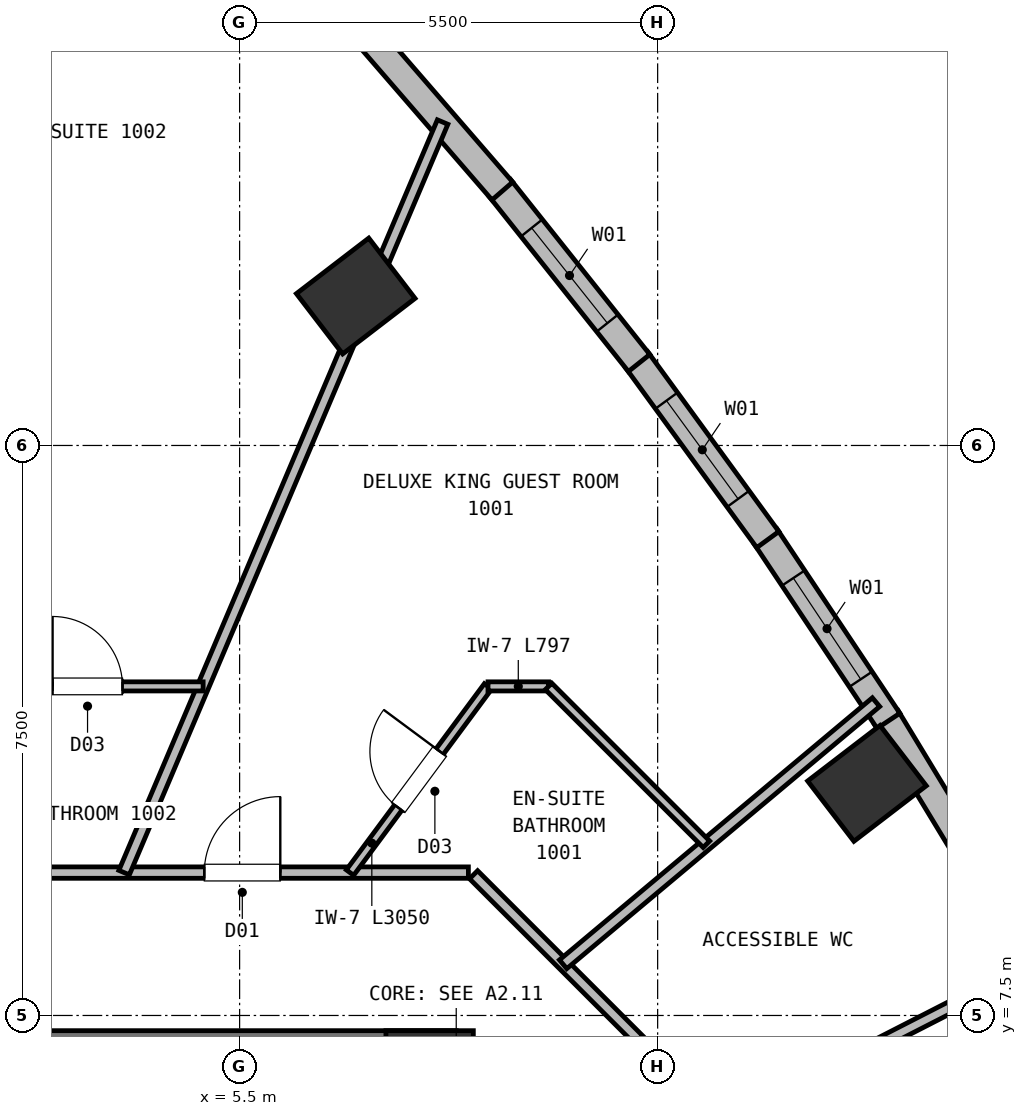
"""IFC4 building model, lengths in metres.
Left out: names, types, materials, properties, quantities, classifications, styles, units other than length and angle.
Written with IfcOpenShell. Run it as: python <this file> out.ifc"""

import sys

from ifc_helpers import new_model, si_unit, direction, frame, frame_2d, origin, origin_2d, place, context, subcontext, project, spatial, rectangle, extrude, element, fill, save


model = new_model("IFC4")
c1 = context("Model", 3, precision=1e-05, world=origin(), true_north=direction((0.0, 1.0)))
c2 = subcontext(c1, "Body", "Model", "MODEL_VIEW")
j1 = project(units=[si_unit("LENGTHUNIT", "METRE"), si_unit("PLANEANGLEUNIT", "RADIAN")], contexts=[c1])
p1 = place(None, origin())
s1 = spatial("IfcSite", under=j1, at=p1, CompositionType="ELEMENT")
p2 = place(p1, origin())
s2 = spatial("IfcBuilding", under=s1, at=p2, CompositionType="ELEMENT")
p3 = place(p2, frame((0.0, 0.0, 34.25)))
s3 = spatial("IfcBuildingStorey", under=s2, at=p3, CompositionType="ELEMENT", Elevation=34.25)
p4 = place(p3, frame((8.0, 6.6, 0.0), z_axis=(0.0, 0.0, 1.0), x_axis=(1.0, 0.0, 0.0)))
e1 = element("IfcColumn", 1, at=p4, inside=s3, PredefinedType="COLUMN", context=c2, shape_type="SweptSolid", body=[
    extrude(rectangle(XDim=1.15, YDim=1.4, at=origin_2d()), origin(), (0.0, 0.0, 1.0), 3.75),
])
p5 = place(p3, frame((-8.35, 6.95, 0.0), z_axis=(0.0, 0.0, 1.0), x_axis=(1.0, 0.0, 0.0)))
e2 = element("IfcWall", 2, at=p5, inside=s3, PredefinedType="SHEAR", context=c2, shape_type="SweptSolid", body=[
    extrude(rectangle(XDim=16.7, YDim=0.7, at=frame_2d((8.35, 0.0))), origin(), (0.0, 0.0, 1.0), 3.5),
])
for number, where, z_axis, x_axis in (
    (3, (13.754, 10.554, 0.0), (0.0, 0.0, 1.0), (-0.609, 0.793, 0.0)),
    (4, (7.028, 16.966, 0.0), (0.0, 0.0, 1.0), (-0.609, 0.793, 0.0)),
):
    element("IfcColumn", number, at=place(p3, frame(where, z_axis=z_axis, x_axis=x_axis)), inside=s3, PredefinedType="COLUMN", context=c2, shape_type="SweptSolid", body=[
        extrude(rectangle(XDim=1.0, YDim=1.2, at=origin_2d()), origin(), (0.0, 0.0, 1.0), 3.75),
    ])
p6 = place(p3, frame((14.01, 11.419, 0.0), z_axis=(0.0, 0.0, 1.0), x_axis=(0.518463491903, -0.855099764685, 0.0)))
e5 = element("IfcWall", 5, at=p6, inside=s3, PredefinedType="SOLIDWALL", context=c2, shape_type="SweptSolid", body=[
    extrude(rectangle(XDim=2.91, YDim=0.36, at=frame_2d((1.455, 0.0))), origin(), (0.0, 0.0, 1.0), 3.5),
])
p7 = place(p3, frame((12.421, 13.802, 0.0), z_axis=(0.0, 0.0, 1.0), x_axis=(0.554410222631, -0.832243537099, 0.0)))
e6 = element("IfcWall", 6, at=p7, inside=s3, PredefinedType="SOLIDWALL", context=c2, shape_type="SweptSolid", body=[
    extrude(rectangle(XDim=2.915, YDim=0.36, at=frame_2d((1.458, 0.0))), origin(), (0.0, 0.0, 1.0), 3.5),
])
p8 = place(p7, frame((0.657, 0.0, 0.72)))
e7 = element("IfcOpeningElement", 7, at=p8, cuts=e6, PredefinedType="OPENING", context=c2, shape_type="SweptSolid", body=[
    extrude(rectangle(XDim=1.6, YDim=1.88, at=frame_2d((0.8, 0.94))), frame((0.0, 0.19, 0.0), z_axis=(0.0, -1.0, 0.0), x_axis=(1.0, 0.0, 0.0)), (0.0, 0.0, 1.0), 0.38),
])
p9 = place(p3, frame((10.726, 16.125, 0.0), z_axis=(0.0, 0.0, 1.0), x_axis=(0.589223239374, -0.807970280507, 0.0)))
e8 = element("IfcWall", 8, at=p9, inside=s3, PredefinedType="SOLIDWALL", context=c2, shape_type="SweptSolid", body=[
    extrude(rectangle(XDim=2.925, YDim=0.36, at=frame_2d((1.463, 0.0))), origin(), (0.0, 0.0, 1.0), 3.5),
])
p10 = place(p9, frame((0.663, 0.0, 0.72)))
e9 = element("IfcOpeningElement", 9, at=p10, cuts=e8, PredefinedType="OPENING", context=c2, shape_type="SweptSolid", body=[
    extrude(rectangle(XDim=1.6, YDim=1.88, at=frame_2d((0.8, 0.94))), frame((0.0, 0.19, 0.0), z_axis=(0.0, -1.0, 0.0), x_axis=(1.0, 0.0, 0.0)), (0.0, 0.0, 1.0), 0.38),
])
p11 = place(p3, frame((8.925, 18.387, 0.0), z_axis=(0.0, 0.0, 1.0), x_axis=(0.622637946995, -0.782510055502, 0.0)))
e10 = element("IfcWall", 10, at=p11, inside=s3, PredefinedType="SOLIDWALL", context=c2, shape_type="SweptSolid", body=[
    extrude(rectangle(XDim=2.941, YDim=0.36, at=frame_2d((1.471, 0.0))), origin(), (0.0, 0.0, 1.0), 3.5),
])
p12 = place(p11, frame((0.67, 0.0, 0.72)))
e11 = element("IfcOpeningElement", 11, at=p12, cuts=e10, PredefinedType="OPENING", context=c2, shape_type="SweptSolid", body=[
    extrude(rectangle(XDim=1.6, YDim=1.88, at=frame_2d((0.8, 0.94))), frame((0.0, 0.19, 0.0), z_axis=(0.0, -1.0, 0.0), x_axis=(1.0, 0.0, 0.0)), (0.0, 0.0, 1.0), 0.38),
])
p13 = place(p3, frame((7.018, 20.587, 0.0), z_axis=(0.0, 0.0, 1.0), x_axis=(0.654585220283, -0.755988220402, 0.0)))
e12 = element("IfcWall", 12, at=p13, inside=s3, PredefinedType="SOLIDWALL", context=c2, shape_type="SweptSolid", body=[
    extrude(rectangle(XDim=2.961, YDim=0.36, at=frame_2d((1.481, 0.0))), origin(), (0.0, 0.0, 1.0), 3.5),
])
p14 = place(p3, frame((8.578, 9.352, 0.0), z_axis=(0.0, 0.0, 1.0), x_axis=(0.707067066127, -0.707146494016, 0.0)))
e13 = element("IfcWall", 13, at=p14, inside=s3, PredefinedType="PARTITIONING", context=c2, shape_type="SweptSolid", body=[
    extrude(rectangle(XDim=3.074, YDim=0.15, at=frame_2d((1.537, 0.0))), origin(), (0.0, 0.0, 1.0), 3.5),
])
p15 = place(p3, frame((-8.51, 9.38, 0.0), z_axis=(0.0, 0.0, 1.0), x_axis=(1.0, 0.0, 0.0)))
e14 = element("IfcWall", 14, at=p15, inside=s3, PredefinedType="PARTITIONING", context=c2, shape_type="SweptSolid", body=[
    extrude(rectangle(XDim=17.02, YDim=0.15, at=frame_2d((8.51, 0.0))), origin(), (0.0, 0.0, 1.0), 3.5),
])
p16 = place(p15, frame((13.545, 0.0, 0.0)))
e15 = element("IfcOpeningElement", 15, at=p16, cuts=e14, PredefinedType="OPENING", context=c2, shape_type="SweptSolid", body=[
    extrude(rectangle(XDim=1.0, YDim=2.15, at=frame_2d((0.5, 1.075))), frame((0.0, 0.085, 0.0), z_axis=(0.0, -1.0, 0.0), x_axis=(1.0, 0.0, 0.0)), (0.0, 0.0, 1.0), 0.17),
])
p17 = place(p15, frame((3.095, 0.0, 0.0)))
e16 = element("IfcOpeningElement", 16, at=p17, cuts=e14, PredefinedType="OPENING", context=c2, shape_type="SweptSolid", body=[
    extrude(rectangle(XDim=1.06, YDim=2.15, at=frame_2d((0.53, 1.075))), frame((0.0, 0.085, 0.0), z_axis=(0.0, -1.0, 0.0), x_axis=(1.0, 0.0, 0.0)), (0.0, 0.0, 1.0), 0.17),
])
p18 = place(p15, frame((8.402, 0.0, 0.0)))
e17 = element("IfcOpeningElement", 17, at=p18, cuts=e14, PredefinedType="OPENING", context=c2, shape_type="SweptSolid", body=[
    extrude(rectangle(XDim=1.06, YDim=2.15, at=frame_2d((0.53, 1.075))), frame((0.0, 0.085, 0.0), z_axis=(0.0, -1.0, 0.0), x_axis=(1.0, 0.0, 0.0)), (0.0, 0.0, 1.0), 0.17),
])
p19 = place(p3, frame((9.756, 8.174, 0.0), z_axis=(0.0, 0.0, 1.0), x_axis=(0.766556770399, 0.642176547186, 0.0)))
e18 = element("IfcWall", 18, at=p19, inside=s3, PredefinedType="PARTITIONING", context=c2, shape_type="SweptSolid", body=[
    extrude(rectangle(XDim=5.37, YDim=0.15, at=frame_2d((2.685, 0.0))), origin(), (0.0, 0.0, 1.0), 3.5),
])
p20 = place(p3, frame((6.952, 9.38, 0.0), z_axis=(0.0, 0.0, 1.0), x_axis=(0.595378789074, 0.80344514282, 0.0)))
e19 = element("IfcWall", 19, at=p20, inside=s3, PredefinedType="PARTITIONING", context=c2, shape_type="SweptSolid", body=[
    extrude(rectangle(XDim=3.05, YDim=0.12, at=frame_2d((1.525, 0.0))), origin(), (0.0, 0.0, 1.0), 3.5),
])
p21 = place(p20, frame((1.065, 0.0, 0.0)))
e20 = element("IfcOpeningElement", 20, at=p21, cuts=e19, PredefinedType="OPENING", context=c2, shape_type="SweptSolid", body=[
    extrude(rectangle(XDim=0.92, YDim=2.1, at=frame_2d((0.46, 1.05))), frame((0.0, 0.07, 0.0), z_axis=(0.0, -1.0, 0.0), x_axis=(1.0, 0.0, 0.0)), (0.0, 0.0, 1.0), 0.14),
])
p22 = place(p3, frame((8.768, 11.83, 0.0), z_axis=(0.0, 0.0, 1.0), x_axis=(1.0, 0.0, 0.0)))
e21 = element("IfcWall", 21, at=p22, inside=s3, PredefinedType="PARTITIONING", context=c2, shape_type="SweptSolid", body=[
    extrude(rectangle(XDim=0.797, YDim=0.12, at=frame_2d((0.398, 0.0))), origin(), (0.0, 0.0, 1.0), 3.5),
])
p23 = place(p3, frame((9.565, 11.83, 0.0), z_axis=(0.0, 0.0, 1.0), x_axis=(0.707106781187, -0.707106781187, 0.0)))
e22 = element("IfcWall", 22, at=p23, inside=s3, PredefinedType="PARTITIONING", context=c2, shape_type="SweptSolid", body=[
    extrude(rectangle(XDim=2.938, YDim=0.12, at=frame_2d((1.469, 0.0))), origin(), (0.0, 0.0, 1.0), 3.5),
])
p24 = place(p3, frame((3.98, 9.38, 0.0), z_axis=(0.0, 0.0, 1.0), x_axis=(0.390626405148, 0.920549298843, 0.0)))
e23 = element("IfcWall", 23, at=p24, inside=s3, PredefinedType="PARTITIONING", context=c2, shape_type="SweptSolid", body=[
    extrude(rectangle(XDim=10.728, YDim=0.15, at=frame_2d((5.364, 0.0))), origin(), (0.0, 0.0, 1.0), 3.5),
])
p25 = place(p3, frame((1.979, 11.83, 0.0), z_axis=(0.0, 0.0, 1.0), x_axis=(1.0, 0.0, 0.0)))
e24 = element("IfcWall", 24, at=p25, inside=s3, PredefinedType="PARTITIONING", context=c2, shape_type="SweptSolid", body=[
    extrude(rectangle(XDim=3.042, YDim=0.12, at=frame_2d((1.521, 0.0))), origin(), (0.0, 0.0, 1.0), 3.5),
])
p26 = place(p25, frame((1.061, 0.0, 0.0)))
e25 = element("IfcOpeningElement", 25, at=p26, cuts=e24, PredefinedType="OPENING", context=c2, shape_type="SweptSolid", body=[
    extrude(rectangle(XDim=0.92, YDim=2.1, at=frame_2d((0.46, 1.05))), frame((0.0, 0.07, 0.0), z_axis=(0.0, -1.0, 0.0), x_axis=(1.0, 0.0, 0.0)), (0.0, 0.0, 1.0), 0.14),
])
p27 = place(p3, frame((10.78, 5.522, 0.0), z_axis=(0.0, 0.0, 1.0), x_axis=(0.889994161799, 0.455971920149, 0.0)))
e26 = element("IfcWall", 26, at=p27, inside=s3, PredefinedType="PARTITIONING", context=c2, shape_type="SweptSolid", body=[
    extrude(rectangle(XDim=5.795, YDim=0.15, at=frame_2d((2.897, 0.0))), origin(), (0.0, 0.0, 1.0), 3.5),
])
p28 = place(p8, origin())
e27 = element("IfcWindow", 27, at=p28, inside=s3, PartitioningType="SINGLE_PANEL", PredefinedType="WINDOW", context=c2, shape_type="SweptSolid", body=[
    extrude(rectangle(XDim=1.6, YDim=1.88, at=frame_2d((0.8, 0.94))), frame((0.0, 0.03, 0.0), z_axis=(0.0, -1.0, 0.0), x_axis=(1.0, 0.0, 0.0)), (0.0, 0.0, 1.0), 0.06),
])
fill(e7, e27)
p29 = place(p10, origin())
e28 = element("IfcWindow", 28, at=p29, inside=s3, PartitioningType="SINGLE_PANEL", PredefinedType="WINDOW", context=c2, shape_type="SweptSolid", body=[
    extrude(rectangle(XDim=1.6, YDim=1.88, at=frame_2d((0.8, 0.94))), frame((0.0, 0.03, 0.0), z_axis=(0.0, -1.0, 0.0), x_axis=(1.0, 0.0, 0.0)), (0.0, 0.0, 1.0), 0.06),
])
fill(e9, e28)
p30 = place(p12, origin())
e29 = element("IfcWindow", 29, at=p30, inside=s3, PartitioningType="SINGLE_PANEL", PredefinedType="WINDOW", context=c2, shape_type="SweptSolid", body=[
    extrude(rectangle(XDim=1.6, YDim=1.88, at=frame_2d((0.8, 0.94))), frame((0.0, 0.03, 0.0), z_axis=(0.0, -1.0, 0.0), x_axis=(1.0, 0.0, 0.0)), (0.0, 0.0, 1.0), 0.06),
])
fill(e11, e29)
p31 = place(p21, origin())
e30 = element("IfcDoor", 30, at=p31, inside=s3, OperationType="SINGLE_SWING_RIGHT", PredefinedType="DOOR", context=c2, shape_type="SweptSolid", body=[
    extrude(rectangle(XDim=0.92, YDim=2.1, at=frame_2d((0.46, 1.05))), frame((0.0, 0.025, 0.0), z_axis=(0.0, -1.0, 0.0), x_axis=(1.0, 0.0, 0.0)), (0.0, 0.0, 1.0), 0.05),
])
fill(e20, e30)
p32 = place(p26, origin())
e31 = element("IfcDoor", 31, at=p32, inside=s3, OperationType="SINGLE_SWING_LEFT", PredefinedType="DOOR", context=c2, shape_type="SweptSolid", body=[
    extrude(rectangle(XDim=0.92, YDim=2.1, at=frame_2d((0.46, 1.05))), frame((0.0, 0.025, 0.0), z_axis=(0.0, -1.0, 0.0), x_axis=(1.0, 0.0, 0.0)), (0.0, 0.0, 1.0), 0.05),
])
fill(e25, e31)
p33 = place(p16, origin())
e32 = element("IfcDoor", 32, at=p33, inside=s3, OperationType="SINGLE_SWING_RIGHT", PredefinedType="DOOR", context=c2, shape_type="SweptSolid", body=[
    extrude(rectangle(XDim=1.0, YDim=2.15, at=frame_2d((0.5, 1.075))), frame((0.0, 0.025, 0.0), z_axis=(0.0, -1.0, 0.0), x_axis=(1.0, 0.0, 0.0)), (0.0, 0.0, 1.0), 0.05),
])
fill(e15, e32)
save(model, sys.argv[1])
